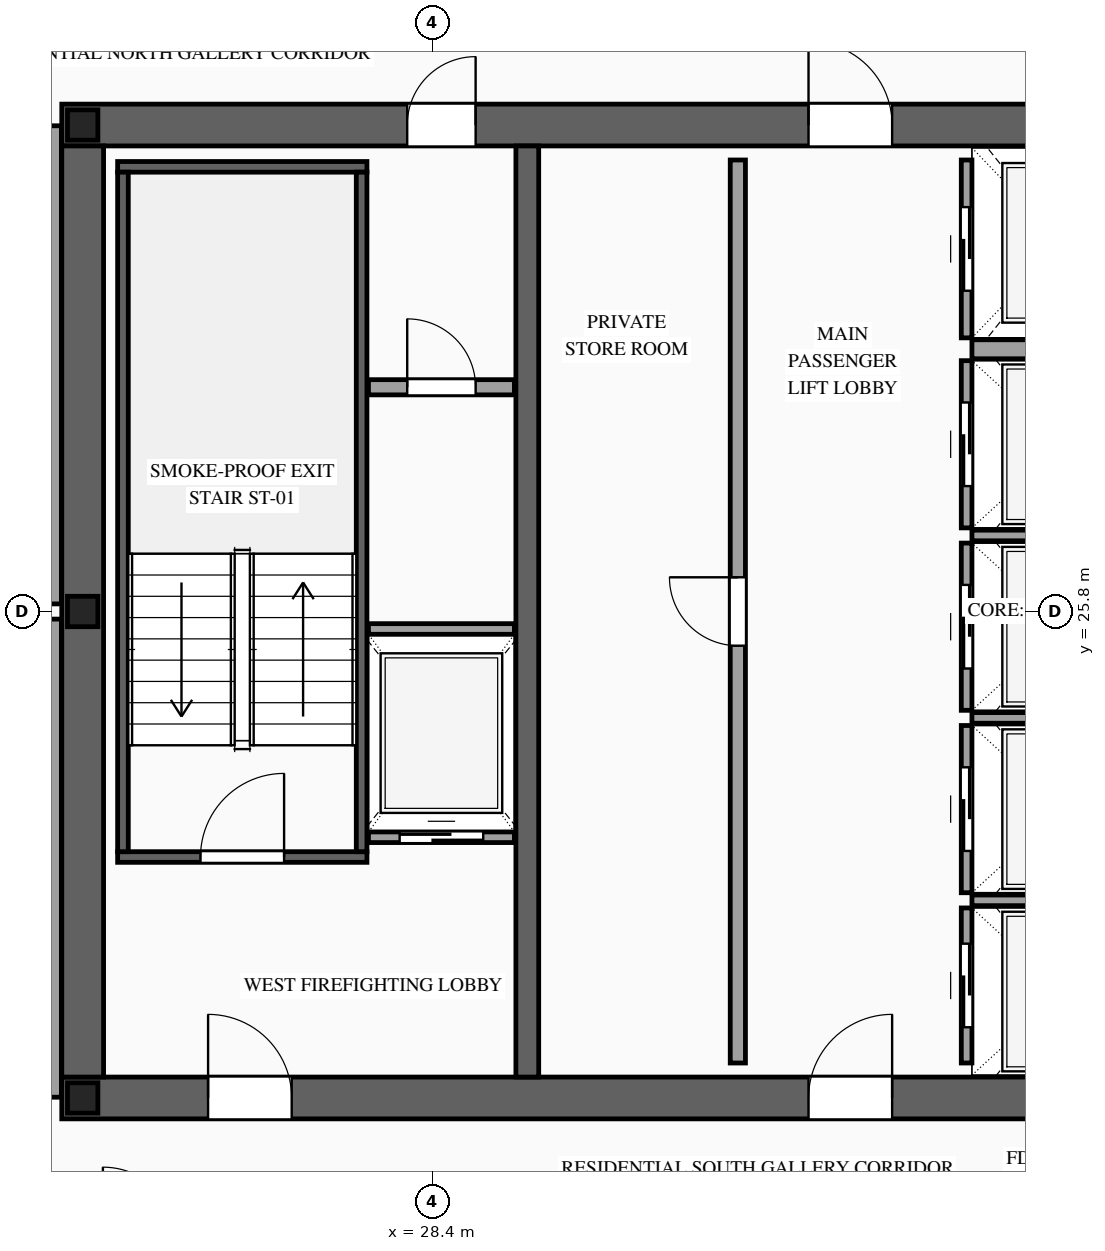
"""IFC4 building model, lengths in metres.
Left out: names, types, materials, properties, quantities, classifications, styles, units other than length and angle.
Written with IfcOpenShell. Run it as: python <this file> out.ifc"""

import sys

from ifc_helpers import new_model, si_unit, direction, frame, frame_2d, origin, origin_2d, place, context, subcontext, project, spatial, rectangle, i_section, extrude, source, transform, mapped, element, fill, save


model = new_model("IFC4")
c1 = context("Model", 3, precision=1e-05, world=origin(), true_north=direction((0.0, 1.0)))
c2 = subcontext(c1, "Body", "Model", "MODEL_VIEW")
j1 = project(units=[si_unit("LENGTHUNIT", "METRE"), si_unit("PLANEANGLEUNIT", "RADIAN")], contexts=[c1])
p1 = place(None, origin())
s1 = spatial("IfcSite", under=j1, at=p1, CompositionType="ELEMENT")
p2 = place(p1, origin())
s2 = spatial("IfcBuilding", under=s1, at=p2, CompositionType="ELEMENT")
p3 = place(p2, frame((0.0, 0.0, 245.1)))
s3 = spatial("IfcBuildingStorey", under=s2, at=p3, CompositionType="ELEMENT", Elevation=245.1)
p4 = place(p3, frame((23.525, 19.4, 0.0), z_axis=(0.0, 0.0, 1.0), x_axis=(1.0, 0.0, 0.0)))
e1 = element("IfcWall", 1, at=p4, inside=s3, PredefinedType="SHEAR", context=c2, shape_type="SweptSolid", body=[
    extrude(rectangle(XDim=26.95, YDim=0.55, at=frame_2d((13.475, 0.0))), origin(), (0.0, 0.0, 1.0), 3.5),
])
p5 = place(p4, frame((1.925, 0.0, 0.0)))
e2 = element("IfcOpeningElement", 2, at=p5, cuts=e1, PredefinedType="OPENING", context=c2, shape_type="SweptSolid", body=[
    extrude(rectangle(XDim=1.1, YDim=2.2, at=frame_2d((0.55, 1.1))), frame((0.0, 0.29, 0.0), z_axis=(0.0, -1.0, 0.0), x_axis=(1.0, 0.0, 0.0)), (0.0, 0.0, 1.0), 0.58),
])
p6 = place(p4, frame((9.825, 0.0, 0.0)))
e3 = element("IfcOpeningElement", 3, at=p6, cuts=e1, PredefinedType="OPENING", context=c2, shape_type="SweptSolid", body=[
    extrude(rectangle(XDim=1.1, YDim=2.2, at=frame_2d((0.55, 1.1))), frame((0.0, 0.29, 0.0), z_axis=(0.0, -1.0, 0.0), x_axis=(1.0, 0.0, 0.0)), (0.0, 0.0, 1.0), 0.58),
])
p7 = place(p4, frame((23.025, 0.0, 0.0)))
e4 = element("IfcOpeningElement", 4, at=p7, cuts=e1, PredefinedType="OPENING", context=c2, shape_type="SweptSolid", body=[
    extrude(rectangle(XDim=1.1, YDim=2.2, at=frame_2d((0.55, 1.1))), frame((0.0, 0.29, 0.0), z_axis=(0.0, -1.0, 0.0), x_axis=(1.0, 0.0, 0.0)), (0.0, 0.0, 1.0), 0.58),
])
p8 = place(p4, frame((19.645, 0.0, 0.0)))
e5 = element("IfcOpeningElement", 5, at=p8, cuts=e1, PredefinedType="OPENING", context=c2, shape_type="SweptSolid", body=[
    extrude(rectangle(XDim=0.9, YDim=2.15, at=frame_2d((0.45, 1.075))), frame((0.0, 0.29, 0.0), z_axis=(0.0, -1.0, 0.0), x_axis=(1.0, 0.0, 0.0)), (0.0, 0.0, 1.0), 0.58),
])
p9 = place(p4, frame((18.205, 0.0, 0.0)))
e6 = element("IfcOpeningElement", 6, at=p9, cuts=e1, PredefinedType="OPENING", context=c2, shape_type="SweptSolid", body=[
    extrude(rectangle(XDim=0.9, YDim=2.15, at=frame_2d((0.45, 1.075))), frame((0.0, 0.29, 0.0), z_axis=(0.0, -1.0, 0.0), x_axis=(1.0, 0.0, 0.0)), (0.0, 0.0, 1.0), 0.58),
])
p10 = place(p3, frame((23.525, 32.2, 0.0), z_axis=(0.0, 0.0, 1.0), x_axis=(1.0, 0.0, 0.0)))
e7 = element("IfcWall", 7, at=p10, inside=s3, PredefinedType="SHEAR", context=c2, shape_type="SweptSolid", body=[
    extrude(rectangle(XDim=26.95, YDim=0.55, at=frame_2d((13.475, 0.0))), origin(), (0.0, 0.0, 1.0), 3.5),
])
p11 = place(p10, frame((4.545, 0.0, 0.0)))
e8 = element("IfcOpeningElement", 8, at=p11, cuts=e7, PredefinedType="OPENING", context=c2, shape_type="SweptSolid", body=[
    extrude(rectangle(XDim=0.9, YDim=2.15, at=frame_2d((0.45, 1.075))), frame((0.0, 0.29, 0.0), z_axis=(0.0, -1.0, 0.0), x_axis=(1.0, 0.0, 0.0)), (0.0, 0.0, 1.0), 0.58),
])
p12 = place(p10, frame((9.825, 0.0, 0.0)))
e9 = element("IfcOpeningElement", 9, at=p12, cuts=e7, PredefinedType="OPENING", context=c2, shape_type="SweptSolid", body=[
    extrude(rectangle(XDim=1.1, YDim=2.2, at=frame_2d((0.55, 1.1))), frame((0.0, 0.29, 0.0), z_axis=(0.0, -1.0, 0.0), x_axis=(1.0, 0.0, 0.0)), (0.0, 0.0, 1.0), 0.58),
])
p13 = place(p10, frame((15.675, 0.0, 0.0)))
e10 = element("IfcOpeningElement", 10, at=p13, cuts=e7, PredefinedType="OPENING", context=c2, shape_type="SweptSolid", body=[
    extrude(rectangle(XDim=1.1, YDim=2.2, at=frame_2d((0.55, 1.1))), frame((0.0, 0.29, 0.0), z_axis=(0.0, -1.0, 0.0), x_axis=(1.0, 0.0, 0.0)), (0.0, 0.0, 1.0), 0.58),
])
m1 = source(origin(), c2, "Body", "SweptSolid", [
    extrude(rectangle(XDim=12.25, YDim=0.55, at=frame_2d((6.125, 0.0))), origin(), (0.0, 0.0, 1.0), 3.5),
])
p14 = place(p3, frame((23.8, 19.675, 0.0), z_axis=(0.0, 0.0, 1.0), x_axis=(0.0, 1.0, 0.0)))
e11 = element("IfcWall", 11, at=p14, inside=s3, PredefinedType="SHEAR", context=c2, shape_type="MappedRepresentation", body=[
    mapped(m1, transform((0.0, 0.0, 0.0), scale=1.0)),
])
m2 = source(origin(), c2, "Body", "SweptSolid", [
    extrude(rectangle(XDim=12.25, YDim=0.3, at=frame_2d((6.125, 0.0))), origin(), (0.0, 0.0, 1.0), 3.5),
])
p15 = place(p3, frame((29.65, 19.675, 0.0), z_axis=(0.0, 0.0, 1.0), x_axis=(0.0, 1.0, 0.0)))
e12 = element("IfcWall", 12, at=p15, inside=s3, PredefinedType="SOLIDWALL", context=c2, shape_type="MappedRepresentation", body=[
    mapped(m2, transform((0.0, 0.0, 0.0), scale=1.0)),
])
m3 = source(origin(), c2, "Body", "SweptSolid", [
    extrude(i_section(OverallWidth=0.4, OverallDepth=0.4, WebThickness=0.013, FlangeThickness=0.021, at=origin_2d()), origin(), (0.0, 0.0, 1.0), 3.5),
])
for number, where, z_axis, x_axis in (
    (13, (23.8, 19.4, 0.0), (0.0, 0.0, 1.0), (1.0, 0.0, 0.0)),
    (14, (23.8, 25.8, 0.0), (0.0, 0.0, 1.0), (1.0, 0.0, 0.0)),
    (15, (23.8, 32.2, 0.0), (0.0, 0.0, 1.0), (1.0, 0.0, 0.0)),
):
    element("IfcColumn", number, at=place(p3, frame(where, z_axis=z_axis, x_axis=x_axis)), inside=s3, PredefinedType="COLUMN", context=c2, shape_type="MappedRepresentation", body=[
        mapped(m3, transform((0.0, 0.0, 0.0), scale=1.0)),
    ])
p16 = place(p3, frame((27.56, 22.83, 0.0), z_axis=(0.0, 0.0, 1.0), x_axis=(1.0, 0.0, 0.0)))
e16 = element("IfcWall", 16, at=p16, inside=s3, PredefinedType="SOLIDWALL", context=c2, shape_type="SweptSolid", body=[
    extrude(rectangle(XDim=1.92, YDim=0.14, at=frame_2d((0.96, 0.0))), origin(), (0.0, 0.0, 1.0), 3.28),
])
p17 = place(p16, frame((0.41, 0.0, 0.0)))
e17 = element("IfcOpeningElement", 17, at=p17, cuts=e16, PredefinedType="OPENING", context=c2, shape_type="SweptSolid", body=[
    extrude(rectangle(XDim=1.1, YDim=2.2, at=frame_2d((0.55, 1.1))), frame((0.0, 0.085, 0.0), z_axis=(0.0, -1.0, 0.0), x_axis=(1.0, 0.0, 0.0)), (0.0, 0.0, 1.0), 0.17),
])
m4 = source(origin(), c2, "Body", "SweptSolid", [
    extrude(rectangle(XDim=1.92, YDim=0.14, at=frame_2d((0.96, 0.0))), origin(), (0.0, 0.0, 1.0), 3.28),
])
p18 = place(p3, frame((27.56, 25.57, 0.0), z_axis=(0.0, 0.0, 1.0), x_axis=(1.0, 0.0, 0.0)))
e18 = element("IfcWall", 18, at=p18, inside=s3, PredefinedType="SOLIDWALL", context=c2, shape_type="MappedRepresentation", body=[
    mapped(m4, transform((0.0, 0.0, 0.0), scale=1.0)),
])
p19 = place(p3, frame((35.43, 19.86, 0.0), z_axis=(0.0, 0.0, 1.0), x_axis=(0.0, 1.0, 0.0)))
e19 = element("IfcWall", 19, at=p19, inside=s3, PredefinedType="SOLIDWALL", context=c2, shape_type="SweptSolid", body=[
    extrude(rectangle(XDim=2.04, YDim=0.14, at=frame_2d((1.02, 0.0))), origin(), (0.0, 0.0, 1.0), 3.28),
])
p20 = place(p19, frame((0.47, 0.0, 0.0)))
e20 = element("IfcOpeningElement", 20, at=p20, cuts=e19, PredefinedType="OPENING", context=c2, shape_type="SweptSolid", body=[
    extrude(rectangle(XDim=1.1, YDim=2.2, at=frame_2d((0.55, 1.1))), frame((0.0, 0.085, 0.0), z_axis=(0.0, -1.0, 0.0), x_axis=(1.0, 0.0, 0.0)), (0.0, 0.0, 1.0), 0.17),
])
m5 = source(origin(), c2, "Body", "SweptSolid", [
    extrude(rectangle(XDim=2.4, YDim=0.14, at=frame_2d((1.2, 0.0))), origin(), (0.0, 0.0, 1.0), 3.28),
])
p21 = place(p3, frame((35.5, 22.0, 0.0), z_axis=(0.0, 0.0, 1.0), x_axis=(1.0, 0.0, 0.0)))
e21 = element("IfcWall", 21, at=p21, inside=s3, PredefinedType="SOLIDWALL", context=c2, shape_type="MappedRepresentation", body=[
    mapped(m5, transform((0.0, 0.0, 0.0), scale=1.0)),
])
p22 = place(p3, frame((35.43, 22.1, 0.0), z_axis=(0.0, 0.0, 1.0), x_axis=(0.0, 1.0, 0.0)))
e22 = element("IfcWall", 22, at=p22, inside=s3, PredefinedType="SOLIDWALL", context=c2, shape_type="SweptSolid", body=[
    extrude(rectangle(XDim=2.2, YDim=0.14, at=frame_2d((1.1, 0.0))), origin(), (0.0, 0.0, 1.0), 3.28),
])
p23 = place(p22, frame((0.55, 0.0, 0.0)))
e23 = element("IfcOpeningElement", 23, at=p23, cuts=e22, PredefinedType="OPENING", context=c2, shape_type="SweptSolid", body=[
    extrude(rectangle(XDim=1.1, YDim=2.2, at=frame_2d((0.55, 1.1))), frame((0.0, 0.085, 0.0), z_axis=(0.0, -1.0, 0.0), x_axis=(1.0, 0.0, 0.0)), (0.0, 0.0, 1.0), 0.17),
])
p24 = place(p3, frame((35.5, 24.4, 0.0), z_axis=(0.0, 0.0, 1.0), x_axis=(1.0, 0.0, 0.0)))
e24 = element("IfcWall", 24, at=p24, inside=s3, PredefinedType="SOLIDWALL", context=c2, shape_type="MappedRepresentation", body=[
    mapped(m5, transform((0.0, 0.0, 0.0), scale=1.0)),
])
p25 = place(p3, frame((35.43, 24.5, 0.0), z_axis=(0.0, 0.0, 1.0), x_axis=(0.0, 1.0, 0.0)))
e25 = element("IfcWall", 25, at=p25, inside=s3, PredefinedType="SOLIDWALL", context=c2, shape_type="SweptSolid", body=[
    extrude(rectangle(XDim=2.2, YDim=0.14, at=frame_2d((1.1, 0.0))), origin(), (0.0, 0.0, 1.0), 3.28),
])
p26 = place(p25, frame((0.55, 0.0, 0.0)))
e26 = element("IfcOpeningElement", 26, at=p26, cuts=e25, PredefinedType="OPENING", context=c2, shape_type="SweptSolid", body=[
    extrude(rectangle(XDim=1.1, YDim=2.2, at=frame_2d((0.55, 1.1))), frame((0.0, 0.085, 0.0), z_axis=(0.0, -1.0, 0.0), x_axis=(1.0, 0.0, 0.0)), (0.0, 0.0, 1.0), 0.17),
])
p27 = place(p3, frame((35.5, 26.8, 0.0), z_axis=(0.0, 0.0, 1.0), x_axis=(1.0, 0.0, 0.0)))
e27 = element("IfcWall", 27, at=p27, inside=s3, PredefinedType="SOLIDWALL", context=c2, shape_type="MappedRepresentation", body=[
    mapped(m5, transform((0.0, 0.0, 0.0), scale=1.0)),
])
p28 = place(p3, frame((35.43, 26.9, 0.0), z_axis=(0.0, 0.0, 1.0), x_axis=(0.0, 1.0, 0.0)))
e28 = element("IfcWall", 28, at=p28, inside=s3, PredefinedType="SOLIDWALL", context=c2, shape_type="SweptSolid", body=[
    extrude(rectangle(XDim=2.2, YDim=0.14, at=frame_2d((1.1, 0.0))), origin(), (0.0, 0.0, 1.0), 3.28),
])
p29 = place(p28, frame((0.55, 0.0, 0.0)))
e29 = element("IfcOpeningElement", 29, at=p29, cuts=e28, PredefinedType="OPENING", context=c2, shape_type="SweptSolid", body=[
    extrude(rectangle(XDim=1.1, YDim=2.2, at=frame_2d((0.55, 1.1))), frame((0.0, 0.085, 0.0), z_axis=(0.0, -1.0, 0.0), x_axis=(1.0, 0.0, 0.0)), (0.0, 0.0, 1.0), 0.17),
])
p30 = place(p3, frame((35.43, 29.4, 0.0), z_axis=(0.0, 0.0, 1.0), x_axis=(0.0, 1.0, 0.0)))
e30 = element("IfcWall", 30, at=p30, inside=s3, PredefinedType="SOLIDWALL", context=c2, shape_type="SweptSolid", body=[
    extrude(rectangle(XDim=2.34, YDim=0.14, at=frame_2d((1.17, 0.0))), origin(), (0.0, 0.0, 1.0), 3.28),
])
p31 = place(p30, frame((0.62, 0.0, 0.0)))
e31 = element("IfcOpeningElement", 31, at=p31, cuts=e30, PredefinedType="OPENING", context=c2, shape_type="SweptSolid", body=[
    extrude(rectangle(XDim=1.1, YDim=2.2, at=frame_2d((0.55, 1.1))), frame((0.0, 0.085, 0.0), z_axis=(0.0, -1.0, 0.0), x_axis=(1.0, 0.0, 0.0)), (0.0, 0.0, 1.0), 0.17),
])
m6 = source(origin(), c2, "Body", "SweptSolid", [
    extrude(rectangle(XDim=2.4, YDim=0.25, at=frame_2d((1.2, 0.0))), origin(), (0.0, 0.0, 1.0), 3.28),
])
p32 = place(p3, frame((35.5, 29.25, 0.0), z_axis=(0.0, 0.0, 1.0), x_axis=(1.0, 0.0, 0.0)))
e32 = element("IfcWall", 32, at=p32, inside=s3, PredefinedType="SOLIDWALL", context=c2, shape_type="MappedRepresentation", body=[
    mapped(m6, transform((0.0, 0.0, 0.0), scale=1.0)),
])
p33 = place(p3, frame((24.26, 22.57, 0.0), z_axis=(0.0, 0.0, 1.0), x_axis=(1.0, 0.0, 0.0)))
e33 = element("IfcWall", 33, at=p33, inside=s3, PredefinedType="SOLIDWALL", context=c2, shape_type="SweptSolid", body=[
    extrude(rectangle(XDim=3.28, YDim=0.14, at=frame_2d((1.64, 0.0))), origin(), (0.0, 0.0, 1.0), 3.28),
])
p34 = place(p33, frame((1.09, 0.0, 0.0)))
e34 = element("IfcOpeningElement", 34, at=p34, cuts=e33, PredefinedType="OPENING", context=c2, shape_type="SweptSolid", body=[
    extrude(rectangle(XDim=1.1, YDim=2.2, at=frame_2d((0.55, 1.1))), frame((0.0, 0.085, 0.0), z_axis=(0.0, -1.0, 0.0), x_axis=(1.0, 0.0, 0.0)), (0.0, 0.0, 1.0), 0.17),
])
m7 = source(origin(), c2, "Body", "SweptSolid", [
    extrude(rectangle(XDim=3.28, YDim=0.14, at=frame_2d((1.64, 0.0))), origin(), (0.0, 0.0, 1.0), 3.28),
])
p35 = place(p3, frame((24.26, 31.65, 0.0), z_axis=(0.0, 0.0, 1.0), x_axis=(1.0, 0.0, 0.0)))
e35 = element("IfcWall", 35, at=p35, inside=s3, PredefinedType="SOLIDWALL", context=c2, shape_type="MappedRepresentation", body=[
    mapped(m7, transform((0.0, 0.0, 0.0), scale=1.0)),
])
m8 = source(origin(), c2, "Body", "SweptSolid", [
    extrude(rectangle(XDim=8.94, YDim=0.14, at=frame_2d((4.47, 0.0))), origin(), (0.0, 0.0, 1.0), 3.28),
])
for number, where, z_axis, x_axis in (
    (36, (24.33, 22.64, 0.0), (0.0, 0.0, 1.0), (0.0, 1.0, 0.0)),
    (37, (27.47, 22.64, 0.0), (0.0, 0.0, 1.0), (0.0, 1.0, 0.0)),
):
    element("IfcWall", number, at=place(p3, frame(where, z_axis=z_axis, x_axis=x_axis)), inside=s3, PredefinedType="SOLIDWALL", context=c2, shape_type="MappedRepresentation", body=[
        mapped(m8, transform((0.0, 0.0, 0.0), scale=1.0)),
    ])
p36 = place(p3, frame((27.56, 28.75, 0.0), z_axis=(0.0, 0.0, 1.0), x_axis=(1.0, 0.0, 0.0)))
e38 = element("IfcWall", 38, at=p36, inside=s3, PredefinedType="PARTITIONING", context=c2, shape_type="SweptSolid", body=[
    extrude(rectangle(XDim=1.92, YDim=0.2, at=frame_2d((0.96, 0.0))), origin(), (0.0, 0.0, 1.0), 3.28),
])
p37 = place(p36, frame((0.51, 0.0, 0.0)))
e39 = element("IfcOpeningElement", 39, at=p37, cuts=e38, PredefinedType="OPENING", context=c2, shape_type="SweptSolid", body=[
    extrude(rectangle(XDim=0.9, YDim=2.15, at=frame_2d((0.45, 1.075))), frame((0.0, 0.115, 0.0), z_axis=(0.0, -1.0, 0.0), x_axis=(1.0, 0.0, 0.0)), (0.0, 0.0, 1.0), 0.23),
])
p38 = place(p3, frame((32.42, 19.86, 0.0), z_axis=(0.0, 0.0, 1.0), x_axis=(0.0, 1.0, 0.0)))
e40 = element("IfcWall", 40, at=p38, inside=s3, PredefinedType="PARTITIONING", context=c2, shape_type="SweptSolid", body=[
    extrude(rectangle(XDim=11.88, YDim=0.2, at=frame_2d((5.94, 0.0))), origin(), (0.0, 0.0, 1.0), 3.28),
])
p39 = place(p38, frame((5.49, 0.0, 0.0)))
e41 = element("IfcOpeningElement", 41, at=p39, cuts=e40, PredefinedType="OPENING", context=c2, shape_type="SweptSolid", body=[
    extrude(rectangle(XDim=0.9, YDim=2.15, at=frame_2d((0.45, 1.075))), frame((0.0, 0.115, 0.0), z_axis=(0.0, -1.0, 0.0), x_axis=(1.0, 0.0, 0.0)), (0.0, 0.0, 1.0), 0.23),
])
m9 = source(origin(), c2, "Body", "SweptSolid", [
    extrude(rectangle(XDim=6.29, YDim=0.2, at=frame_2d((3.145, 0.0))), origin(), (0.0, 0.0, 1.0), 3.28),
])
for number, where, z_axis, x_axis in (
    (42, (23.42, 19.41, 0.0), (0.0, 0.0, 1.0), (0.0, 1.0, 0.0)),
    (43, (23.42, 25.9, 0.0), (0.0, 0.0, 1.0), (0.0, 1.0, 0.0)),
):
    element("IfcWall", number, at=place(p3, frame(where, z_axis=z_axis, x_axis=x_axis)), inside=s3, PredefinedType="PARTITIONING", context=c2, shape_type="MappedRepresentation", body=[
        mapped(m9, transform((0.0, 0.0, 0.0), scale=1.0)),
    ])
m10 = source(origin(), c2, "Body", "SweptSolid", [
    extrude(rectangle(XDim=1.1, YDim=2.2, at=frame_2d((0.55, 1.1))), frame((0.0, 0.025, 0.0), z_axis=(0.0, -1.0, 0.0), x_axis=(1.0, 0.0, 0.0)), (0.0, 0.0, 1.0), 0.05),
])
p40 = place(p17, origin())
e44 = element("IfcDoor", 44, at=p40, inside=s3, OperationType="SLIDING_TO_LEFT", PredefinedType="DOOR", context=c2, shape_type="MappedRepresentation", body=[
    mapped(m10, transform((0.0, 0.0, 0.0), scale=1.0)),
])
fill(e17, e44)
p41 = place(p20, origin())
e45 = element("IfcDoor", 45, at=p41, inside=s3, OperationType="SLIDING_TO_RIGHT", PredefinedType="DOOR", context=c2, shape_type="MappedRepresentation", body=[
    mapped(m10, transform((0.0, 0.0, 0.0), scale=1.0)),
])
fill(e20, e45)
p42 = place(p23, origin())
e46 = element("IfcDoor", 46, at=p42, inside=s3, OperationType="SLIDING_TO_LEFT", PredefinedType="DOOR", context=c2, shape_type="MappedRepresentation", body=[
    mapped(m10, transform((0.0, 0.0, 0.0), scale=1.0)),
])
fill(e23, e46)
p43 = place(p26, origin())
e47 = element("IfcDoor", 47, at=p43, inside=s3, OperationType="SLIDING_TO_RIGHT", PredefinedType="DOOR", context=c2, shape_type="MappedRepresentation", body=[
    mapped(m10, transform((0.0, 0.0, 0.0), scale=1.0)),
])
fill(e26, e47)
p44 = place(p29, origin())
e48 = element("IfcDoor", 48, at=p44, inside=s3, OperationType="SLIDING_TO_LEFT", PredefinedType="DOOR", context=c2, shape_type="MappedRepresentation", body=[
    mapped(m10, transform((0.0, 0.0, 0.0), scale=1.0)),
])
fill(e29, e48)
p45 = place(p31, origin())
e49 = element("IfcDoor", 49, at=p45, inside=s3, OperationType="SLIDING_TO_RIGHT", PredefinedType="DOOR", context=c2, shape_type="MappedRepresentation", body=[
    mapped(m10, transform((0.0, 0.0, 0.0), scale=1.0)),
])
fill(e31, e49)
m11 = source(origin(), c2, "Body", "SweptSolid", [
    extrude(rectangle(XDim=1.1, YDim=2.2, at=frame_2d((0.55, 1.1))), frame((0.0, 0.025, 0.0), z_axis=(0.0, -1.0, 0.0), x_axis=(1.0, 0.0, 0.0)), (0.0, 0.0, 1.0), 0.05),
])
p46 = place(p34, origin())
e50 = element("IfcDoor", 50, at=p46, inside=s3, OperationType="SINGLE_SWING_RIGHT", PredefinedType="DOOR", context=c2, shape_type="MappedRepresentation", body=[
    mapped(m11, transform((0.0, 0.0, 0.0), scale=1.0)),
])
fill(e34, e50)
p47 = place(p5, origin())
e51 = element("IfcDoor", 51, at=p47, inside=s3, OperationType="SINGLE_SWING_LEFT", PredefinedType="DOOR", context=c2, shape_type="MappedRepresentation", body=[
    mapped(m11, transform((0.0, 0.0, 0.0), scale=1.0)),
])
fill(e2, e51)
p48 = place(p6, origin())
e52 = element("IfcDoor", 52, at=p48, inside=s3, OperationType="SINGLE_SWING_RIGHT", PredefinedType="DOOR", context=c2, shape_type="MappedRepresentation", body=[
    mapped(m11, transform((0.0, 0.0, 0.0), scale=1.0)),
])
fill(e3, e52)
m12 = source(origin(), c2, "Body", "SweptSolid", [
    extrude(rectangle(XDim=0.9, YDim=2.15, at=frame_2d((0.45, 1.075))), frame((0.0, 0.025, 0.0), z_axis=(0.0, -1.0, 0.0), x_axis=(1.0, 0.0, 0.0)), (0.0, 0.0, 1.0), 0.05),
])
p49 = place(p11, origin())
e53 = element("IfcDoor", 53, at=p49, inside=s3, OperationType="SINGLE_SWING_RIGHT", PredefinedType="DOOR", context=c2, shape_type="MappedRepresentation", body=[
    mapped(m12, transform((0.0, 0.0, 0.0), scale=1.0)),
])
fill(e8, e53)
p50 = place(p12, origin())
e54 = element("IfcDoor", 54, at=p50, inside=s3, OperationType="SINGLE_SWING_LEFT", PredefinedType="DOOR", context=c2, shape_type="MappedRepresentation", body=[
    mapped(m11, transform((0.0, 0.0, 0.0), scale=1.0)),
])
fill(e9, e54)
p51 = place(p37, origin())
e55 = element("IfcDoor", 55, at=p51, inside=s3, OperationType="SINGLE_SWING_LEFT", PredefinedType="DOOR", context=c2, shape_type="MappedRepresentation", body=[
    mapped(m12, transform((0.0, 0.0, 0.0), scale=1.0)),
])
fill(e39, e55)
p52 = place(p39, origin())
e56 = element("IfcDoor", 56, at=p52, inside=s3, OperationType="SINGLE_SWING_RIGHT", PredefinedType="DOOR", context=c2, shape_type="MappedRepresentation", body=[
    mapped(m12, transform((0.0, 0.0, 0.0), scale=1.0)),
])
fill(e41, e56)
save(model, sys.argv[1])
